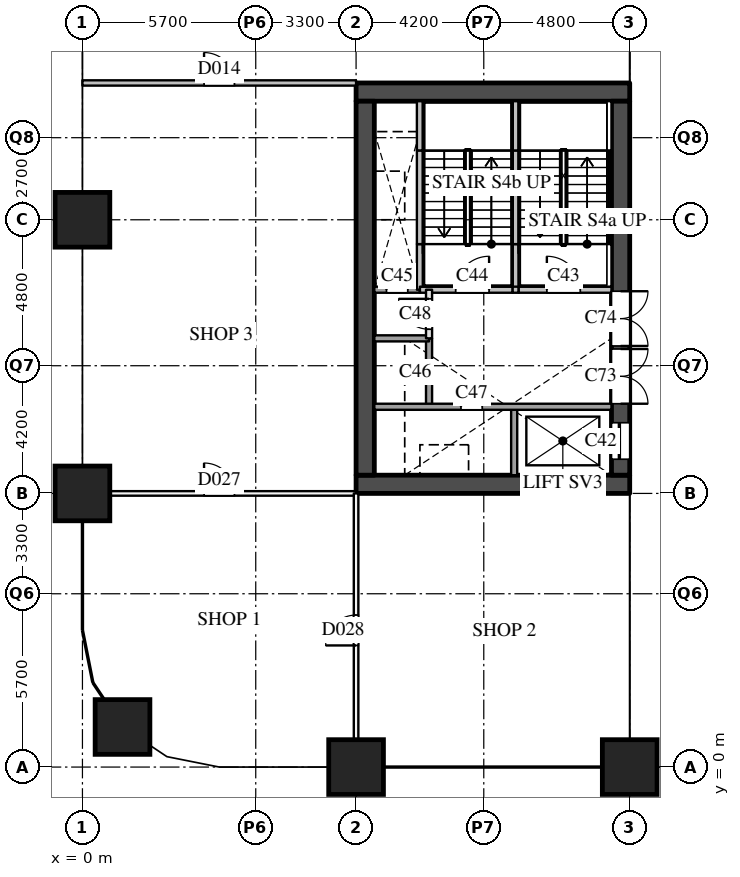
"""IFC4 building model, lengths in metres.
Left out: names, types, materials, properties, quantities, classifications, styles, units other than length and angle.
Written with IfcOpenShell. Run it as: python <this file> out.ifc"""

import sys

from ifc_helpers import new_model, si_unit, direction, frame, frame_2d, origin, origin_2d, place, context, subcontext, project, spatial, rectangle, extrude, element, fill, save


model = new_model("IFC4")
c1 = context("Model", 3, precision=1e-05, world=origin(), true_north=direction((0.0, 1.0)))
c2 = subcontext(c1, "Body", "Model", "MODEL_VIEW")
j1 = project(units=[si_unit("LENGTHUNIT", "METRE"), si_unit("PLANEANGLEUNIT", "RADIAN")], contexts=[c1])
p1 = place(None, origin())
s1 = spatial("IfcSite", under=j1, at=p1, CompositionType="ELEMENT")
p2 = place(p1, origin())
s2 = spatial("IfcBuilding", under=s1, at=p2, CompositionType="ELEMENT")
p3 = place(p2, origin())
s3 = spatial("IfcBuildingStorey", under=s2, at=p3, CompositionType="ELEMENT", Elevation=0.0)
for number, where, z_axis, x_axis in (
    (1, (1.318, 1.318, 0.0), (0.0, 0.0, 1.0), (1.0, 0.0, 0.0)),
    (2, (0.0, 9.0, 0.0), (0.0, 0.0, 1.0), (1.0, 0.0, 0.0)),
    (3, (0.0, 18.0, 0.0), (0.0, 0.0, 1.0), (1.0, 0.0, 0.0)),
    (4, (9.0, 0.0, 0.0), (0.0, 0.0, 1.0), (1.0, 0.0, 0.0)),
    (5, (18.0, 0.0, 0.0), (0.0, 0.0, 1.0), (1.0, 0.0, 0.0)),
):
    element("IfcColumn", number, at=place(p3, frame(where, z_axis=z_axis, x_axis=x_axis)), inside=s3, PredefinedType="COLUMN", context=c2, shape_type="SweptSolid", body=[
        extrude(rectangle(XDim=1.8, YDim=1.8, at=origin_2d()), origin(), (0.0, 0.0, 1.0), 8.0),
    ])
for number, where, z_axis, x_axis in (
    (6, (9.0, 9.3, 0.0), (0.0, 0.0, 1.0), (1.0, 0.0, 0.0)),
    (7, (9.0, 22.2, 0.0), (0.0, 0.0, 1.0), (1.0, 0.0, 0.0)),
):
    element("IfcWall", number, at=place(p3, frame(where, z_axis=z_axis, x_axis=x_axis)), inside=s3, PredefinedType="SHEAR", context=c2, shape_type="SweptSolid", body=[
        extrude(rectangle(XDim=9.0, YDim=0.6, at=frame_2d((4.5, 0.0))), origin(), (0.0, 0.0, 1.0), 7.59),
    ])
p4 = place(p3, frame((9.3, 9.6, 0.0), z_axis=(0.0, 0.0, 1.0), x_axis=(0.0, 1.0, 0.0)))
e8 = element("IfcWall", 8, at=p4, inside=s3, PredefinedType="SHEAR", context=c2, shape_type="SweptSolid", body=[
    extrude(rectangle(XDim=12.3, YDim=0.6, at=frame_2d((6.15, 0.0))), origin(), (0.0, 0.0, 1.0), 7.59),
])
p5 = place(p3, frame((17.7, 9.6, 0.0), z_axis=(0.0, 0.0, 1.0), x_axis=(0.0, 1.0, 0.0)))
e9 = element("IfcWall", 9, at=p5, inside=s3, PredefinedType="SHEAR", context=c2, shape_type="SweptSolid", body=[
    extrude(rectangle(XDim=12.3, YDim=0.6, at=frame_2d((6.15, 0.0))), origin(), (0.0, 0.0, 1.0), 7.59),
])
p6 = place(p5, frame((0.525, 0.0, 0.0)))
e10 = element("IfcOpeningElement", 10, at=p6, cuts=e9, PredefinedType="OPENING", context=c2, shape_type="SweptSolid", body=[
    extrude(rectangle(XDim=1.2, YDim=2.1, at=frame_2d((0.6, 1.05))), frame((0.0, 0.31, 0.0), z_axis=(0.0, -1.0, 0.0), x_axis=(1.0, 0.0, 0.0)), (0.0, 0.0, 1.0), 0.62),
])
p7 = place(p5, frame((4.15, 0.0, 0.0), z_axis=(0.0, 0.0, 1.0), x_axis=(-1.0, 0.0, 0.0)))
e11 = element("IfcOpeningElement", 11, at=p7, cuts=e9, PredefinedType="OPENING", context=c2, shape_type="SweptSolid", body=[
    extrude(rectangle(XDim=1.8, YDim=2.4, at=frame_2d((0.9, 1.2))), frame((0.0, 0.31, 0.0), z_axis=(0.0, -1.0, 0.0), x_axis=(1.0, 0.0, 0.0)), (0.0, 0.0, 1.0), 0.62),
])
p8 = place(p5, frame((6.05, 0.0, 0.0), z_axis=(0.0, 0.0, 1.0), x_axis=(-1.0, 0.0, 0.0)))
e12 = element("IfcOpeningElement", 12, at=p8, cuts=e9, PredefinedType="OPENING", context=c2, shape_type="SweptSolid", body=[
    extrude(rectangle(XDim=1.8, YDim=2.4, at=frame_2d((0.9, 1.2))), frame((0.0, 0.31, 0.0), z_axis=(0.0, -1.0, 0.0), x_axis=(1.0, 0.0, 0.0)), (0.0, 0.0, 1.0), 0.62),
])
p9 = place(p3, frame((11.1, 15.7, 0.0), z_axis=(0.0, 0.0, 1.0), x_axis=(0.0, 1.0, 0.0)))
e13 = element("IfcWall", 13, at=p9, inside=s3, PredefinedType="SOLIDWALL", context=c2, shape_type="SweptSolid", body=[
    extrude(rectangle(XDim=1.5, YDim=0.2, at=frame_2d((0.75, 0.0))), origin(), (0.0, 0.0, 1.0), 7.59),
])
p10 = place(p3, frame((11.1, 17.2, 0.0), z_axis=(0.0, 0.0, 1.0), x_axis=(0.0, 1.0, 0.0)))
e14 = element("IfcWall", 14, at=p10, inside=s3, PredefinedType="SOLIDWALL", context=c2, shape_type="SweptSolid", body=[
    extrude(rectangle(XDim=3.08, YDim=0.2, at=frame_2d((1.54, 0.0))), origin(), (0.0, 0.0, 1.0), 7.59),
])
p11 = place(p3, frame((11.1, 20.28, 0.0), z_axis=(0.0, 0.0, 1.0), x_axis=(0.0, 1.0, 0.0)))
e15 = element("IfcWall", 15, at=p11, inside=s3, PredefinedType="SOLIDWALL", context=c2, shape_type="SweptSolid", body=[
    extrude(rectangle(XDim=1.62, YDim=0.2, at=frame_2d((0.81, 0.0))), origin(), (0.0, 0.0, 1.0), 7.59),
])
p12 = place(p3, frame((11.4, 14.1, 0.0), z_axis=(0.0, 0.0, 1.0), x_axis=(0.0, 1.0, 0.0)))
e16 = element("IfcWall", 16, at=p12, inside=s3, PredefinedType="PARTITIONING", context=c2, shape_type="SweptSolid", body=[
    extrude(rectangle(XDim=1.6, YDim=0.2, at=frame_2d((0.8, 0.0))), origin(), (0.0, 0.0, 1.0), 7.59),
])
p13 = place(p12, frame((0.3, 0.0, 0.0)))
e17 = element("IfcOpeningElement", 17, at=p13, cuts=e16, PredefinedType="OPENING", context=c2, shape_type="SweptSolid", body=[
    extrude(rectangle(XDim=1.0, YDim=2.1, at=frame_2d((0.5, 1.05))), frame((0.0, 0.11, 0.0), z_axis=(0.0, -1.0, 0.0), x_axis=(1.0, 0.0, 0.0)), (0.0, 0.0, 1.0), 0.22),
])
p14 = place(p3, frame((11.4, 11.9, 0.0), z_axis=(0.0, 0.0, 1.0), x_axis=(0.0, 1.0, 0.0)))
e18 = element("IfcWall", 18, at=p14, inside=s3, PredefinedType="SOLIDWALL", context=c2, shape_type="SweptSolid", body=[
    extrude(rectangle(XDim=2.2, YDim=0.2, at=frame_2d((1.1, 0.0))), origin(), (0.0, 0.0, 1.0), 7.59),
])
p15 = place(p14, frame((0.75, 0.0, 0.0)))
e19 = element("IfcOpeningElement", 19, at=p15, cuts=e18, PredefinedType="OPENING", context=c2, shape_type="SweptSolid", body=[
    extrude(rectangle(XDim=0.7, YDim=2.1, at=frame_2d((0.35, 1.05))), frame((0.0, 0.11, 0.0), z_axis=(0.0, -1.0, 0.0), x_axis=(1.0, 0.0, 0.0)), (0.0, 0.0, 1.0), 0.22),
])
p16 = place(p3, frame((14.2, 9.6, 0.0), z_axis=(0.0, 0.0, 1.0), x_axis=(0.0, 1.0, 0.0)))
e20 = element("IfcWall", 20, at=p16, inside=s3, PredefinedType="SOLIDWALL", context=c2, shape_type="SweptSolid", body=[
    extrude(rectangle(XDim=2.3, YDim=0.2, at=frame_2d((1.15, 0.0))), origin(), (0.0, 0.0, 1.0), 7.59),
])
p17 = place(p3, frame((14.25, 15.7, 0.0), z_axis=(0.0, 0.0, 1.0), x_axis=(0.0, 1.0, 0.0)))
e21 = element("IfcWall", 21, at=p17, inside=s3, PredefinedType="SOLIDWALL", context=c2, shape_type="SweptSolid", body=[
    extrude(rectangle(XDim=1.5, YDim=0.2, at=frame_2d((0.75, 0.0))), origin(), (0.0, 0.0, 1.0), 7.59),
])
p18 = place(p3, frame((14.25, 17.2, 0.0), z_axis=(0.0, 0.0, 1.0), x_axis=(0.0, 1.0, 0.0)))
e22 = element("IfcWall", 22, at=p18, inside=s3, PredefinedType="SOLIDWALL", context=c2, shape_type="SweptSolid", body=[
    extrude(rectangle(XDim=3.08, YDim=0.2, at=frame_2d((1.54, 0.0))), origin(), (0.0, 0.0, 1.0), 7.59),
])
p19 = place(p3, frame((14.25, 20.28, 0.0), z_axis=(0.0, 0.0, 1.0), x_axis=(0.0, 1.0, 0.0)))
e23 = element("IfcWall", 23, at=p19, inside=s3, PredefinedType="SOLIDWALL", context=c2, shape_type="SweptSolid", body=[
    extrude(rectangle(XDim=1.62, YDim=0.2, at=frame_2d((0.81, 0.0))), origin(), (0.0, 0.0, 1.0), 7.59),
])
p20 = place(p3, frame((9.6, 11.85, 0.0), z_axis=(0.0, 0.0, 1.0), x_axis=(1.0, 0.0, 0.0)))
e24 = element("IfcWall", 24, at=p20, inside=s3, PredefinedType="SOLIDWALL", context=c2, shape_type="SweptSolid", body=[
    extrude(rectangle(XDim=7.8, YDim=0.2, at=frame_2d((3.9, 0.0))), origin(), (0.0, 0.0, 1.0), 7.59),
])
p21 = place(p20, frame((2.85, 0.0, 0.0)))
e25 = element("IfcOpeningElement", 25, at=p21, cuts=e24, PredefinedType="OPENING", context=c2, shape_type="SweptSolid", body=[
    extrude(rectangle(XDim=0.7, YDim=2.1, at=frame_2d((0.35, 1.05))), frame((0.0, 0.11, 0.0), z_axis=(0.0, -1.0, 0.0), x_axis=(1.0, 0.0, 0.0)), (0.0, 0.0, 1.0), 0.22),
])
p22 = place(p3, frame((9.6, 14.1, 0.0), z_axis=(0.0, 0.0, 1.0), x_axis=(1.0, 0.0, 0.0)))
e26 = element("IfcWall", 26, at=p22, inside=s3, PredefinedType="SOLIDWALL", context=c2, shape_type="SweptSolid", body=[
    extrude(rectangle(XDim=1.8, YDim=0.2, at=frame_2d((0.9, 0.0))), origin(), (0.0, 0.0, 1.0), 7.59),
])
p23 = place(p3, frame((9.6, 15.7, 0.0), z_axis=(0.0, 0.0, 1.0), x_axis=(1.0, 0.0, 0.0)))
e27 = element("IfcWall", 27, at=p23, inside=s3, PredefinedType="SOLIDWALL", context=c2, shape_type="SweptSolid", body=[
    extrude(rectangle(XDim=1.5, YDim=0.2, at=frame_2d((0.75, 0.0))), origin(), (0.0, 0.0, 1.0), 7.59),
])
p24 = place(p23, frame((0.4, 0.0, 0.0)))
e28 = element("IfcOpeningElement", 28, at=p24, cuts=e27, PredefinedType="OPENING", context=c2, shape_type="SweptSolid", body=[
    extrude(rectangle(XDim=0.7, YDim=2.1, at=frame_2d((0.35, 1.05))), frame((0.0, 0.11, 0.0), z_axis=(0.0, -1.0, 0.0), x_axis=(1.0, 0.0, 0.0)), (0.0, 0.0, 1.0), 0.22),
])
p25 = place(p3, frame((11.1, 15.7, 0.0), z_axis=(0.0, 0.0, 1.0), x_axis=(1.0, 0.0, 0.0)))
e29 = element("IfcWall", 29, at=p25, inside=s3, PredefinedType="SOLIDWALL", context=c2, shape_type="SweptSolid", body=[
    extrude(rectangle(XDim=3.05, YDim=0.2, at=frame_2d((1.525, 0.0))), origin(), (0.0, 0.0, 1.0), 7.59),
])
p26 = place(p25, frame((1.175, 0.0, 0.0)))
e30 = element("IfcOpeningElement", 30, at=p26, cuts=e29, PredefinedType="OPENING", context=c2, shape_type="SweptSolid", body=[
    extrude(rectangle(XDim=1.1, YDim=2.1, at=frame_2d((0.55, 1.05))), frame((0.0, 0.11, 0.0), z_axis=(0.0, -1.0, 0.0), x_axis=(1.0, 0.0, 0.0)), (0.0, 0.0, 1.0), 0.22),
])
p27 = place(p3, frame((14.15, 15.7, 0.0), z_axis=(0.0, 0.0, 1.0), x_axis=(1.0, 0.0, 0.0)))
e31 = element("IfcWall", 31, at=p27, inside=s3, PredefinedType="SOLIDWALL", context=c2, shape_type="SweptSolid", body=[
    extrude(rectangle(XDim=0.2, YDim=0.2, at=frame_2d((0.1, 0.0))), origin(), (0.0, 0.0, 1.0), 7.59),
])
p28 = place(p3, frame((14.35, 15.7, 0.0), z_axis=(0.0, 0.0, 1.0), x_axis=(1.0, 0.0, 0.0)))
e32 = element("IfcWall", 32, at=p28, inside=s3, PredefinedType="SOLIDWALL", context=c2, shape_type="SweptSolid", body=[
    extrude(rectangle(XDim=3.05, YDim=0.2, at=frame_2d((1.525, 0.0))), origin(), (0.0, 0.0, 1.0), 7.59),
])
p29 = place(p28, frame((0.925, 0.0, 0.0)))
e33 = element("IfcOpeningElement", 33, at=p29, cuts=e32, PredefinedType="OPENING", context=c2, shape_type="SweptSolid", body=[
    extrude(rectangle(XDim=1.1, YDim=2.1, at=frame_2d((0.55, 1.05))), frame((0.0, 0.11, 0.0), z_axis=(0.0, -1.0, 0.0), x_axis=(1.0, 0.0, 0.0)), (0.0, 0.0, 1.0), 0.22),
])
p30 = place(p3, frame((0.0, 22.5, 0.0), z_axis=(0.0, 0.0, 1.0), x_axis=(1.0, 0.0, 0.0)))
e34 = element("IfcWall", 34, at=p30, inside=s3, PredefinedType="PARTITIONING", context=c2, shape_type="SweptSolid", body=[
    extrude(rectangle(XDim=9.0, YDim=0.175, at=frame_2d((4.5, 0.0))), origin(), (0.0, 0.0, 1.0), 6.59),
])
p31 = place(p30, frame((4.0, 0.0, 0.0)))
e35 = element("IfcOpeningElement", 35, at=p31, cuts=e34, PredefinedType="OPENING", context=c2, shape_type="SweptSolid", body=[
    extrude(rectangle(XDim=1.0, YDim=2.1, at=frame_2d((0.5, 1.05))), frame((0.0, 0.097, 0.0), z_axis=(0.0, -1.0, 0.0), x_axis=(1.0, 0.0, 0.0)), (0.0, 0.0, 1.0), 0.195),
])
p32 = place(p3, frame((0.0, 9.0, 0.0), z_axis=(0.0, 0.0, 1.0), x_axis=(1.0, 0.0, 0.0)))
e36 = element("IfcWall", 36, at=p32, inside=s3, PredefinedType="PARTITIONING", context=c2, shape_type="SweptSolid", body=[
    extrude(rectangle(XDim=9.0, YDim=0.15, at=frame_2d((4.5, 0.0))), origin(), (0.0, 0.0, 1.0), 7.59),
])
p33 = place(p32, frame((4.0, 0.0, 0.0)))
e37 = element("IfcOpeningElement", 37, at=p33, cuts=e36, PredefinedType="OPENING", context=c2, shape_type="SweptSolid", body=[
    extrude(rectangle(XDim=1.0, YDim=2.1, at=frame_2d((0.5, 1.05))), frame((0.0, 0.085, 0.0), z_axis=(0.0, -1.0, 0.0), x_axis=(1.0, 0.0, 0.0)), (0.0, 0.0, 1.0), 0.17),
])
p34 = place(p3, frame((9.0, 0.0, 0.0), z_axis=(0.0, 0.0, 1.0), x_axis=(0.0, 1.0, 0.0)))
e38 = element("IfcWall", 38, at=p34, inside=s3, PredefinedType="PARTITIONING", context=c2, shape_type="SweptSolid", body=[
    extrude(rectangle(XDim=9.0, YDim=0.15, at=frame_2d((4.5, 0.0))), origin(), (0.0, 0.0, 1.0), 7.59),
])
p35 = place(p34, frame((4.0, 0.0, 0.0)))
e39 = element("IfcOpeningElement", 39, at=p35, cuts=e38, PredefinedType="OPENING", context=c2, shape_type="SweptSolid", body=[
    extrude(rectangle(XDim=1.0, YDim=2.1, at=frame_2d((0.5, 1.05))), frame((0.0, 0.085, 0.0), z_axis=(0.0, -1.0, 0.0), x_axis=(1.0, 0.0, 0.0)), (0.0, 0.0, 1.0), 0.17),
])
p36 = place(p6, origin())
e40 = element("IfcDoor", 40, at=p36, inside=s3, OperationType="SLIDING_TO_LEFT", PredefinedType="DOOR", context=c2, shape_type="SweptSolid", body=[
    extrude(rectangle(XDim=1.2, YDim=2.1, at=frame_2d((0.6, 1.05))), frame((0.0, 0.025, 0.0), z_axis=(0.0, -1.0, 0.0), x_axis=(1.0, 0.0, 0.0)), (0.0, 0.0, 1.0), 0.05),
])
fill(e10, e40)
p37 = place(p29, origin())
e41 = element("IfcDoor", 41, at=p37, inside=s3, OperationType="SINGLE_SWING_LEFT", PredefinedType="DOOR", context=c2, shape_type="SweptSolid", body=[
    extrude(rectangle(XDim=1.1, YDim=2.1, at=frame_2d((0.55, 1.05))), frame((0.0, 0.025, 0.0), z_axis=(0.0, -1.0, 0.0), x_axis=(1.0, 0.0, 0.0)), (0.0, 0.0, 1.0), 0.05),
])
fill(e33, e41)
p38 = place(p26, origin())
e42 = element("IfcDoor", 42, at=p38, inside=s3, OperationType="SINGLE_SWING_RIGHT", PredefinedType="DOOR", context=c2, shape_type="SweptSolid", body=[
    extrude(rectangle(XDim=1.1, YDim=2.1, at=frame_2d((0.55, 1.05))), frame((0.0, 0.025, 0.0), z_axis=(0.0, -1.0, 0.0), x_axis=(1.0, 0.0, 0.0)), (0.0, 0.0, 1.0), 0.05),
])
fill(e30, e42)
p39 = place(p24, origin())
e43 = element("IfcDoor", 43, at=p39, inside=s3, OperationType="SINGLE_SWING_LEFT", PredefinedType="DOOR", context=c2, shape_type="SweptSolid", body=[
    extrude(rectangle(XDim=0.7, YDim=2.1, at=frame_2d((0.35, 1.05))), frame((0.0, 0.025, 0.0), z_axis=(0.0, -1.0, 0.0), x_axis=(1.0, 0.0, 0.0)), (0.0, 0.0, 1.0), 0.05),
])
fill(e28, e43)
p40 = place(p15, origin())
e44 = element("IfcDoor", 44, at=p40, inside=s3, OperationType="SINGLE_SWING_RIGHT", PredefinedType="DOOR", context=c2, shape_type="SweptSolid", body=[
    extrude(rectangle(XDim=0.7, YDim=2.1, at=frame_2d((0.35, 1.05))), frame((0.0, 0.025, 0.0), z_axis=(0.0, -1.0, 0.0), x_axis=(1.0, 0.0, 0.0)), (0.0, 0.0, 1.0), 0.05),
])
fill(e19, e44)
p41 = place(p21, origin())
e45 = element("IfcDoor", 45, at=p41, inside=s3, OperationType="SINGLE_SWING_LEFT", PredefinedType="DOOR", context=c2, shape_type="SweptSolid", body=[
    extrude(rectangle(XDim=0.7, YDim=2.1, at=frame_2d((0.35, 1.05))), frame((0.0, 0.025, 0.0), z_axis=(0.0, -1.0, 0.0), x_axis=(1.0, 0.0, 0.0)), (0.0, 0.0, 1.0), 0.05),
])
fill(e25, e45)
p42 = place(p13, origin())
e46 = element("IfcDoor", 46, at=p42, inside=s3, OperationType="SINGLE_SWING_RIGHT", PredefinedType="DOOR", context=c2, shape_type="SweptSolid", body=[
    extrude(rectangle(XDim=1.0, YDim=2.1, at=frame_2d((0.5, 1.05))), frame((0.0, 0.025, 0.0), z_axis=(0.0, -1.0, 0.0), x_axis=(1.0, 0.0, 0.0)), (0.0, 0.0, 1.0), 0.05),
])
fill(e17, e46)
p43 = place(p7, origin())
e47 = element("IfcDoor", 47, at=p43, inside=s3, OperationType="DOUBLE_DOOR_SINGLE_SWING", PredefinedType="DOOR", context=c2, shape_type="SweptSolid", body=[
    extrude(rectangle(XDim=1.8, YDim=2.4, at=frame_2d((0.9, 1.2))), frame((0.0, 0.025, 0.0), z_axis=(0.0, -1.0, 0.0), x_axis=(1.0, 0.0, 0.0)), (0.0, 0.0, 1.0), 0.05),
])
fill(e11, e47)
p44 = place(p8, origin())
e48 = element("IfcDoor", 48, at=p44, inside=s3, OperationType="DOUBLE_DOOR_SINGLE_SWING", PredefinedType="DOOR", context=c2, shape_type="SweptSolid", body=[
    extrude(rectangle(XDim=1.8, YDim=2.4, at=frame_2d((0.9, 1.2))), frame((0.0, 0.025, 0.0), z_axis=(0.0, -1.0, 0.0), x_axis=(1.0, 0.0, 0.0)), (0.0, 0.0, 1.0), 0.05),
])
fill(e12, e48)
p45 = place(p31, origin())
e49 = element("IfcDoor", 49, at=p45, inside=s3, OperationType="SINGLE_SWING_LEFT", PredefinedType="DOOR", context=c2, shape_type="SweptSolid", body=[
    extrude(rectangle(XDim=1.0, YDim=2.1, at=frame_2d((0.5, 1.05))), frame((0.0, 0.025, 0.0), z_axis=(0.0, -1.0, 0.0), x_axis=(1.0, 0.0, 0.0)), (0.0, 0.0, 1.0), 0.05),
])
fill(e35, e49)
p46 = place(p33, origin())
e50 = element("IfcDoor", 50, at=p46, inside=s3, OperationType="SINGLE_SWING_LEFT", PredefinedType="DOOR", context=c2, shape_type="SweptSolid", body=[
    extrude(rectangle(XDim=1.0, YDim=2.1, at=frame_2d((0.5, 1.05))), frame((0.0, 0.025, 0.0), z_axis=(0.0, -1.0, 0.0), x_axis=(1.0, 0.0, 0.0)), (0.0, 0.0, 1.0), 0.05),
])
fill(e37, e50)
p47 = place(p35, origin())
e51 = element("IfcDoor", 51, at=p47, inside=s3, OperationType="SINGLE_SWING_LEFT", PredefinedType="DOOR", context=c2, shape_type="SweptSolid", body=[
    extrude(rectangle(XDim=1.0, YDim=2.1, at=frame_2d((0.5, 1.05))), frame((0.0, 0.025, 0.0), z_axis=(0.0, -1.0, 0.0), x_axis=(1.0, 0.0, 0.0)), (0.0, 0.0, 1.0), 0.05),
])
fill(e39, e51)
save(model, sys.argv[1])
